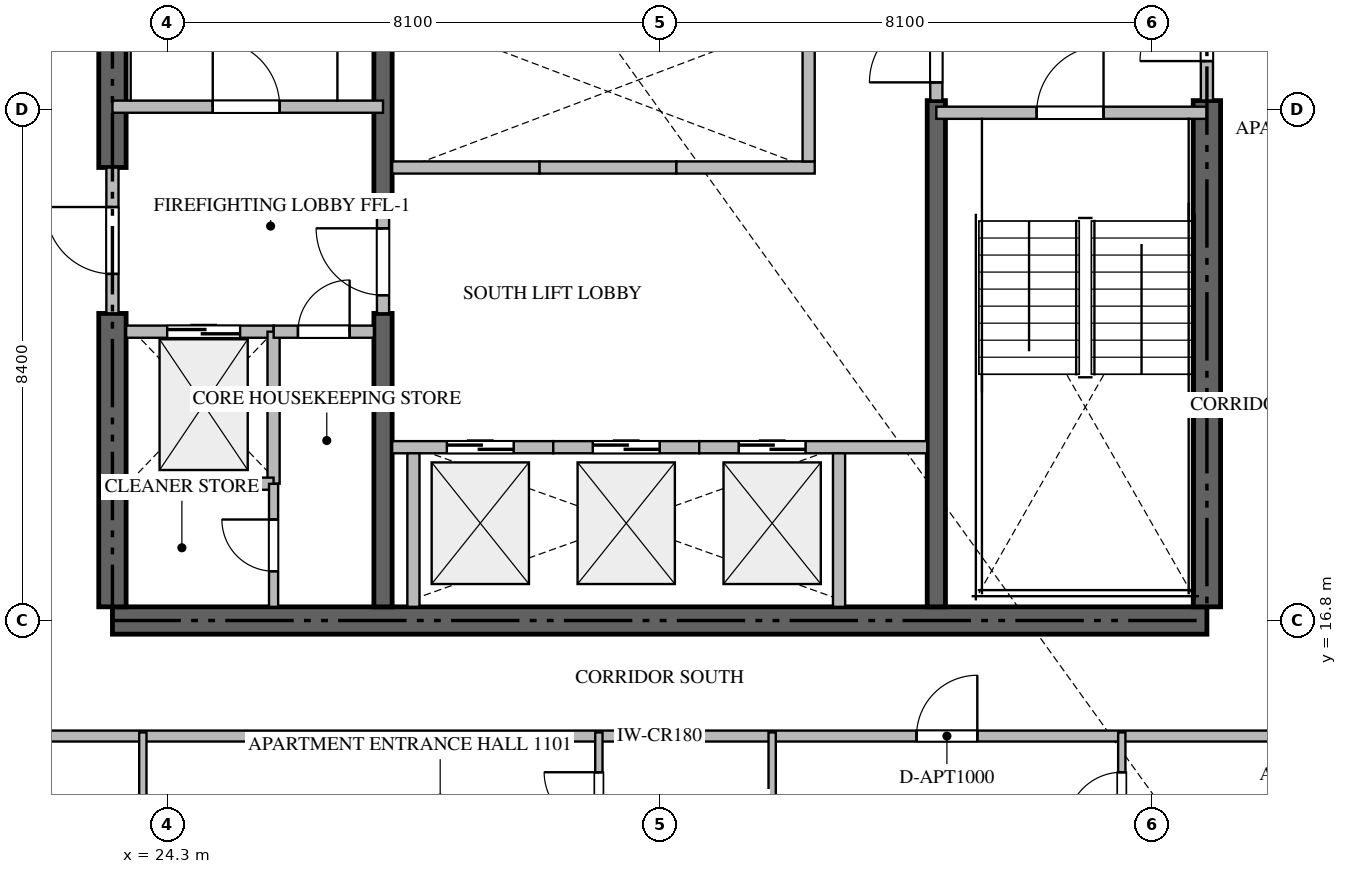
"""IFC4 building model, lengths in metres.
Left out: names, types, materials, properties, quantities, classifications, styles, units other than length and angle.
Written with IfcOpenShell. Run it as: python <this file> out.ifc"""

import sys

from ifc_helpers import new_model, si_unit, direction, frame, frame_2d, origin, place, context, subcontext, project, spatial, rectangle, extrude, source, transform, mapped, element, fill, save


model = new_model("IFC4")
c1 = context("Model", 3, precision=1e-05, world=origin(), true_north=direction((0.0, 1.0)))
c2 = subcontext(c1, "Body", "Model", "MODEL_VIEW")
j1 = project(units=[si_unit("LENGTHUNIT", "METRE"), si_unit("PLANEANGLEUNIT", "RADIAN")], contexts=[c1])
p1 = place(None, origin())
s1 = spatial("IfcSite", under=j1, at=p1, CompositionType="ELEMENT")
p2 = place(p1, origin())
s2 = spatial("IfcBuilding", under=s1, at=p2, CompositionType="ELEMENT")
p3 = place(p2, frame((0.0, 0.0, 49.2)))
s3 = spatial("IfcBuildingStorey", under=s2, at=p3, CompositionType="ELEMENT", Elevation=49.2)
p4 = place(p3, frame((23.4, 16.8, -0.26), z_axis=(0.0, 0.0, 1.0), x_axis=(1.0, 0.0, 0.0)))
e1 = element("IfcWall", 1, at=p4, inside=s3, PredefinedType="SHEAR", context=c2, shape_type="SweptSolid", body=[
    extrude(rectangle(XDim=18.0, YDim=0.45, at=frame_2d((9.0, 0.0))), origin(), (0.0, 0.0, 1.0), 3.748),
])
p5 = place(p3, frame((23.4, 17.025, -0.26), z_axis=(0.0, 0.0, 1.0), x_axis=(0.0, 1.0, 0.0)))
e2 = element("IfcWall", 2, at=p5, inside=s3, PredefinedType="SHEAR", context=c2, shape_type="SweptSolid", body=[
    extrude(rectangle(XDim=4.825, YDim=0.45, at=frame_2d((2.413, 0.0))), origin(), (0.0, 0.0, 1.0), 3.748),
])
p6 = place(p3, frame((23.4, 24.25, -0.26), z_axis=(0.0, 0.0, 1.0), x_axis=(0.0, 1.0, 0.0)))
e3 = element("IfcWall", 3, at=p6, inside=s3, PredefinedType="SHEAR", context=c2, shape_type="SweptSolid", body=[
    extrude(rectangle(XDim=9.125, YDim=0.45, at=frame_2d((4.562, 0.0))), origin(), (0.0, 0.0, 1.0), 3.748),
])
p7 = place(p3, frame((41.4, 17.025, -0.26), z_axis=(0.0, 0.0, 1.0), x_axis=(0.0, 1.0, 0.0)))
e4 = element("IfcWall", 4, at=p7, inside=s3, PredefinedType="SHEAR", context=c2, shape_type="SweptSolid", body=[
    extrude(rectangle(XDim=8.325, YDim=0.45, at=frame_2d((4.163, 0.0))), origin(), (0.0, 0.0, 1.0), 3.748),
])
p8 = place(p3, frame((27.85, 17.025, -0.26), z_axis=(0.0, 0.0, 1.0), x_axis=(0.0, 1.0, 0.0)))
e5 = element("IfcWall", 5, at=p8, inside=s3, PredefinedType="SHEAR", context=c2, shape_type="SweptSolid", body=[
    extrude(rectangle(XDim=4.825, YDim=0.3, at=frame_2d((2.413, 0.0))), origin(), (0.0, 0.0, 1.0), 3.748),
])
p9 = place(p3, frame((27.85, 23.55, -0.26), z_axis=(0.0, 0.0, 1.0), x_axis=(0.0, 1.0, 0.0)))
e6 = element("IfcWall", 6, at=p9, inside=s3, PredefinedType="SHEAR", context=c2, shape_type="SweptSolid", body=[
    extrude(rectangle(XDim=9.825, YDim=0.3, at=frame_2d((4.913, 0.0))), origin(), (0.0, 0.0, 1.0), 3.748),
])
p10 = place(p3, frame((36.95, 17.025, -0.26), z_axis=(0.0, 0.0, 1.0), x_axis=(0.0, 1.0, 0.0)))
e7 = element("IfcWall", 7, at=p10, inside=s3, PredefinedType="SHEAR", context=c2, shape_type="SweptSolid", body=[
    extrude(rectangle(XDim=8.325, YDim=0.3, at=frame_2d((4.163, 0.0))), origin(), (0.0, 0.0, 1.0), 3.748),
])
p11 = place(p3, frame((23.4, 25.25, 0.0), z_axis=(0.0, 0.0, 1.0), x_axis=(1.0, 0.0, 0.0)))
e8 = element("IfcWall", 8, at=p11, inside=s3, PredefinedType="STANDARD", context=c2, shape_type="SweptSolid", body=[
    extrude(rectangle(XDim=4.45, YDim=0.2, at=frame_2d((2.225, 0.0))), origin(), (0.0, 0.0, 1.0), 3.49),
])
p12 = place(p11, frame((1.65, 0.0, 0.0)))
e9 = element("IfcOpeningElement", 9, at=p12, cuts=e8, PredefinedType="OPENING", context=c2, shape_type="SweptSolid", body=[
    extrude(rectangle(XDim=1.1, YDim=2.15, at=frame_2d((0.55, 1.075))), frame((0.0, 0.11, 0.0), z_axis=(0.0, -1.0, 0.0), x_axis=(1.0, 0.0, 0.0)), (0.0, 0.0, 1.0), 0.22),
])
p13 = place(p3, frame((36.95, 25.15, 0.0), z_axis=(0.0, 0.0, 1.0), x_axis=(1.0, 0.0, 0.0)))
e10 = element("IfcWall", 10, at=p13, inside=s3, PredefinedType="STANDARD", context=c2, shape_type="SweptSolid", body=[
    extrude(rectangle(XDim=4.45, YDim=0.2, at=frame_2d((2.225, 0.0))), origin(), (0.0, 0.0, 1.0), 3.49),
])
p14 = place(p13, frame((1.65, 0.0, 0.0)))
e11 = element("IfcOpeningElement", 11, at=p14, cuts=e10, PredefinedType="OPENING", context=c2, shape_type="SweptSolid", body=[
    extrude(rectangle(XDim=1.1, YDim=2.15, at=frame_2d((0.55, 1.075))), frame((0.0, 0.11, 0.0), z_axis=(0.0, -1.0, 0.0), x_axis=(1.0, 0.0, 0.0)), (0.0, 0.0, 1.0), 0.22),
])
p15 = place(p3, frame((23.625, 21.55, 0.0), z_axis=(0.0, 0.0, 1.0), x_axis=(1.0, 0.0, 0.0)))
e12 = element("IfcWall", 12, at=p15, inside=s3, PredefinedType="STANDARD", context=c2, shape_type="SweptSolid", body=[
    extrude(rectangle(XDim=2.425, YDim=0.2, at=frame_2d((1.212, 0.0))), origin(), (0.0, 0.0, 1.0), 3.49),
])
p16 = place(p15, frame((0.675, 0.0, 0.0)))
e13 = element("IfcOpeningElement", 13, at=p16, cuts=e12, PredefinedType="OPENING", context=c2, shape_type="SweptSolid", body=[
    extrude(rectangle(XDim=1.2, YDim=2.2, at=frame_2d((0.6, 1.1))), frame((0.0, 0.11, 0.0), z_axis=(0.0, -1.0, 0.0), x_axis=(1.0, 0.0, 0.0)), (0.0, 0.0, 1.0), 0.22),
])
p17 = place(p3, frame((28.0, 19.65, 0.0), z_axis=(0.0, 0.0, 1.0), x_axis=(1.0, 0.0, 0.0)))
e14 = element("IfcWall", 14, at=p17, inside=s3, PredefinedType="STANDARD", context=c2, shape_type="SweptSolid", body=[
    extrude(rectangle(XDim=2.65, YDim=0.2, at=frame_2d((1.325, 0.0))), origin(), (0.0, 0.0, 1.0), 3.49),
])
p18 = place(p17, frame((0.9, 0.0, 0.0)))
e15 = element("IfcOpeningElement", 15, at=p18, cuts=e14, PredefinedType="OPENING", context=c2, shape_type="SweptSolid", body=[
    extrude(rectangle(XDim=1.1, YDim=2.2, at=frame_2d((0.55, 1.1))), frame((0.0, 0.11, 0.0), z_axis=(0.0, -1.0, 0.0), x_axis=(1.0, 0.0, 0.0)), (0.0, 0.0, 1.0), 0.22),
])
p19 = place(p3, frame((28.35, 17.025, 0.0), z_axis=(0.0, 0.0, 1.0), x_axis=(0.0, 1.0, 0.0)))
e16 = element("IfcWall", 16, at=p19, inside=s3, PredefinedType="STANDARD", context=c2, shape_type="SweptSolid", body=[
    extrude(rectangle(XDim=2.525, YDim=0.2, at=frame_2d((1.263, 0.0))), origin(), (0.0, 0.0, 1.0), 3.49),
])
p20 = place(p3, frame((30.65, 19.65, 0.0), z_axis=(0.0, 0.0, 1.0), x_axis=(1.0, 0.0, 0.0)))
e17 = element("IfcWall", 17, at=p20, inside=s3, PredefinedType="STANDARD", context=c2, shape_type="SweptSolid", body=[
    extrude(rectangle(XDim=2.4, YDim=0.2, at=frame_2d((1.2, 0.0))), origin(), (0.0, 0.0, 1.0), 3.49),
])
p21 = place(p20, frame((0.65, 0.0, 0.0)))
e18 = element("IfcOpeningElement", 18, at=p21, cuts=e17, PredefinedType="OPENING", context=c2, shape_type="SweptSolid", body=[
    extrude(rectangle(XDim=1.1, YDim=2.2, at=frame_2d((0.55, 1.1))), frame((0.0, 0.11, 0.0), z_axis=(0.0, -1.0, 0.0), x_axis=(1.0, 0.0, 0.0)), (0.0, 0.0, 1.0), 0.22),
])
p22 = place(p3, frame((33.05, 19.65, 0.0), z_axis=(0.0, 0.0, 1.0), x_axis=(1.0, 0.0, 0.0)))
e19 = element("IfcWall", 19, at=p22, inside=s3, PredefinedType="STANDARD", context=c2, shape_type="SweptSolid", body=[
    extrude(rectangle(XDim=3.75, YDim=0.2, at=frame_2d((1.875, 0.0))), origin(), (0.0, 0.0, 1.0), 3.49),
])
p23 = place(p22, frame((0.65, 0.0, 0.0)))
e20 = element("IfcOpeningElement", 20, at=p23, cuts=e19, PredefinedType="OPENING", context=c2, shape_type="SweptSolid", body=[
    extrude(rectangle(XDim=1.1, YDim=2.2, at=frame_2d((0.55, 1.1))), frame((0.0, 0.11, 0.0), z_axis=(0.0, -1.0, 0.0), x_axis=(1.0, 0.0, 0.0)), (0.0, 0.0, 1.0), 0.22),
])
p24 = place(p3, frame((35.35, 17.025, 0.0), z_axis=(0.0, 0.0, 1.0), x_axis=(0.0, 1.0, 0.0)))
e21 = element("IfcWall", 21, at=p24, inside=s3, PredefinedType="STANDARD", context=c2, shape_type="SweptSolid", body=[
    extrude(rectangle(XDim=2.525, YDim=0.2, at=frame_2d((1.263, 0.0))), origin(), (0.0, 0.0, 1.0), 3.49),
])
p25 = place(p3, frame((28.0, 24.25, 0.0), z_axis=(0.0, 0.0, 1.0), x_axis=(1.0, 0.0, 0.0)))
e22 = element("IfcWall", 22, at=p25, inside=s3, PredefinedType="STANDARD", context=c2, shape_type="SweptSolid", body=[
    extrude(rectangle(XDim=2.425, YDim=0.2, at=frame_2d((1.212, 0.0))), origin(), (0.0, 0.0, 1.0), 3.49),
])
p26 = place(p3, frame((30.425, 24.25, 0.0), z_axis=(0.0, 0.0, 1.0), x_axis=(1.0, 0.0, 0.0)))
e23 = element("IfcWall", 23, at=p26, inside=s3, PredefinedType="STANDARD", context=c2, shape_type="SweptSolid", body=[
    extrude(rectangle(XDim=2.25, YDim=0.2, at=frame_2d((1.125, 0.0))), origin(), (0.0, 0.0, 1.0), 3.49),
])
p27 = place(p3, frame((32.675, 24.25, 0.0), z_axis=(0.0, 0.0, 1.0), x_axis=(1.0, 0.0, 0.0)))
e24 = element("IfcWall", 24, at=p27, inside=s3, PredefinedType="STANDARD", context=c2, shape_type="SweptSolid", body=[
    extrude(rectangle(XDim=2.275, YDim=0.2, at=frame_2d((1.137, 0.0))), origin(), (0.0, 0.0, 1.0), 3.49),
])
for number, where, z_axis, x_axis in (
    (25, (34.85, 24.35, 0.0), (0.0, 0.0, 1.0), (0.0, 1.0, 0.0)),
    (26, (26.05, 19.05, 0.0), (0.0, 0.0, 1.0), (0.0, 1.0, 0.0)),
):
    element("IfcWall", number, at=place(p3, frame(where, z_axis=z_axis, x_axis=x_axis)), inside=s3, PredefinedType="STANDARD", context=c2, shape_type="SweptSolid", body=[
        extrude(rectangle(XDim=2.5, YDim=0.2, at=frame_2d((1.25, 0.0))), origin(), (0.0, 0.0, 1.0), 3.49),
    ])
p28 = place(p3, frame((23.625, 19.05, 0.0), z_axis=(0.0, 0.0, 1.0), x_axis=(1.0, 0.0, 0.0)))
e27 = element("IfcWall", 27, at=p28, inside=s3, PredefinedType="STANDARD", context=c2, shape_type="SweptSolid", body=[
    extrude(rectangle(XDim=2.425, YDim=0.2, at=frame_2d((1.212, 0.0))), origin(), (0.0, 0.0, 1.0), 3.49),
])
p29 = place(p3, frame((26.052, 21.55, 0.0), z_axis=(0.0, 0.0, 1.0), x_axis=(1.0, 0.0, 0.0)))
e28 = element("IfcWall", 28, at=p29, inside=s3, PredefinedType="STANDARD", context=c2, shape_type="SweptSolid", body=[
    extrude(rectangle(XDim=1.648, YDim=0.2, at=frame_2d((0.824, 0.0))), origin(), (0.0, 0.0, 1.0), 3.49),
])
p30 = place(p29, frame((0.399, 0.0, 0.0)))
e29 = element("IfcOpeningElement", 29, at=p30, cuts=e28, PredefinedType="OPENING", context=c2, shape_type="SweptSolid", body=[
    extrude(rectangle(XDim=0.85, YDim=2.1, at=frame_2d((0.425, 1.05))), frame((0.0, 0.11, 0.0), z_axis=(0.0, -1.0, 0.0), x_axis=(1.0, 0.0, 0.0)), (0.0, 0.0, 1.0), 0.22),
])
p31 = place(p3, frame((23.4, 21.852, 0.0), z_axis=(0.0, 0.0, 1.0), x_axis=(0.0, 1.0, 0.0)))
e30 = element("IfcWall", 30, at=p31, inside=s3, PredefinedType="STANDARD", context=c2, shape_type="SweptSolid", body=[
    extrude(rectangle(XDim=2.396, YDim=0.2, at=frame_2d((1.198, 0.0))), origin(), (0.0, 0.0, 1.0), 3.49),
])
p32 = place(p31, frame((0.648, 0.0, 0.0)))
e31 = element("IfcOpeningElement", 31, at=p32, cuts=e30, PredefinedType="OPENING", context=c2, shape_type="SweptSolid", body=[
    extrude(rectangle(XDim=1.1, YDim=2.15, at=frame_2d((0.55, 1.075))), frame((0.0, 0.11, 0.0), z_axis=(0.0, -1.0, 0.0), x_axis=(1.0, 0.0, 0.0)), (0.0, 0.0, 1.0), 0.22),
])
p33 = place(p3, frame((41.4, 25.352, 0.0), z_axis=(0.0, 0.0, 1.0), x_axis=(0.0, 1.0, 0.0)))
e32 = element("IfcWall", 32, at=p33, inside=s3, PredefinedType="STANDARD", context=c2, shape_type="SweptSolid", body=[
    extrude(rectangle(XDim=2.396, YDim=0.2, at=frame_2d((1.198, 0.0))), origin(), (0.0, 0.0, 1.0), 3.49),
])
p34 = place(p33, frame((0.648, 0.0, 0.0)))
e33 = element("IfcOpeningElement", 33, at=p34, cuts=e32, PredefinedType="OPENING", context=c2, shape_type="SweptSolid", body=[
    extrude(rectangle(XDim=1.1, YDim=2.15, at=frame_2d((0.55, 1.075))), frame((0.0, 0.11, 0.0), z_axis=(0.0, -1.0, 0.0), x_axis=(1.0, 0.0, 0.0)), (0.0, 0.0, 1.0), 0.22),
])
p35 = place(p3, frame((27.85, 21.852, 0.0), z_axis=(0.0, 0.0, 1.0), x_axis=(0.0, 1.0, 0.0)))
e34 = element("IfcWall", 34, at=p35, inside=s3, PredefinedType="STANDARD", context=c2, shape_type="SweptSolid", body=[
    extrude(rectangle(XDim=1.696, YDim=0.2, at=frame_2d((0.848, 0.0))), origin(), (0.0, 0.0, 1.0), 3.49),
])
p36 = place(p35, frame((0.298, 0.0, 0.0)))
e35 = element("IfcOpeningElement", 35, at=p36, cuts=e34, PredefinedType="OPENING", context=c2, shape_type="SweptSolid", body=[
    extrude(rectangle(XDim=1.1, YDim=2.15, at=frame_2d((0.55, 1.075))), frame((0.0, 0.11, 0.0), z_axis=(0.0, -1.0, 0.0), x_axis=(1.0, 0.0, 0.0)), (0.0, 0.0, 1.0), 0.22),
])
p37 = place(p3, frame((36.95, 25.352, 0.0), z_axis=(0.0, 0.0, 1.0), x_axis=(0.0, 1.0, 0.0)))
e36 = element("IfcWall", 36, at=p37, inside=s3, PredefinedType="STANDARD", context=c2, shape_type="SweptSolid", body=[
    extrude(rectangle(XDim=1.696, YDim=0.2, at=frame_2d((0.848, 0.0))), origin(), (0.0, 0.0, 1.0), 3.49),
])
p38 = place(p37, frame((0.298, 0.0, 0.0)))
e37 = element("IfcOpeningElement", 37, at=p38, cuts=e36, PredefinedType="OPENING", context=c2, shape_type="SweptSolid", body=[
    extrude(rectangle(XDim=1.1, YDim=2.15, at=frame_2d((0.55, 1.075))), frame((0.0, 0.11, 0.0), z_axis=(0.0, -1.0, 0.0), x_axis=(1.0, 0.0, 0.0)), (0.0, 0.0, 1.0), 0.22),
])
p39 = place(p3, frame((26.05, 17.025, 0.0), z_axis=(0.0, 0.0, 1.0), x_axis=(0.0, 1.0, 0.0)))
e38 = element("IfcWall", 38, at=p39, inside=s3, PredefinedType="PARTITIONING", context=c2, shape_type="SweptSolid", body=[
    extrude(rectangle(XDim=2.023, YDim=0.15, at=frame_2d((1.012, 0.0))), origin(), (0.0, 0.0, 1.0), 3.49),
])
p40 = place(p39, frame((0.586, 0.0, 0.0)))
e39 = element("IfcOpeningElement", 39, at=p40, cuts=e38, PredefinedType="OPENING", context=c2, shape_type="SweptSolid", body=[
    extrude(rectangle(XDim=0.85, YDim=2.1, at=frame_2d((0.425, 1.05))), frame((0.0, 0.085, 0.0), z_axis=(0.0, -1.0, 0.0), x_axis=(1.0, 0.0, 0.0)), (0.0, 0.0, 1.0), 0.17),
])
p41 = place(p3, frame((21.402, 14.9, 0.0), z_axis=(0.0, 0.0, 1.0), x_axis=(1.0, 0.0, 0.0)))
e40 = element("IfcWall", 40, at=p41, inside=s3, PredefinedType="PARTITIONING", context=c2, shape_type="SweptSolid", body=[
    extrude(rectangle(XDim=21.996, YDim=0.18, at=frame_2d((10.998, 0.0))), origin(), (0.0, 0.0, 1.0), 3.49),
])
p42 = place(p41, frame((15.222, 0.0, 0.0)))
e41 = element("IfcOpeningElement", 41, at=p42, cuts=e40, PredefinedType="OPENING", context=c2, shape_type="SweptSolid", body=[
    extrude(rectangle(XDim=1.0, YDim=2.15, at=frame_2d((0.5, 1.075))), frame((0.0, 0.1, 0.0), z_axis=(0.0, -1.0, 0.0), x_axis=(1.0, 0.0, 0.0)), (0.0, 0.0, 1.0), 0.2),
])
p43 = place(p3, frame((34.25, 12.15, 0.0), z_axis=(0.0, 0.0, 1.0), x_axis=(0.0, 1.0, 0.0)))
e42 = element("IfcWall", 42, at=p43, inside=s3, PredefinedType="PARTITIONING", context=c2, shape_type="SweptSolid", body=[
    extrude(rectangle(XDim=2.81, YDim=0.12, at=frame_2d((1.405, 0.0))), origin(), (0.0, 0.0, 1.0), 3.49),
])
p44 = place(p3, frame((31.4, 12.75, 0.0), z_axis=(0.0, 0.0, 1.0), x_axis=(0.0, 1.0, 0.0)))
e43 = element("IfcWall", 43, at=p44, inside=s3, PredefinedType="PARTITIONING", context=c2, shape_type="SweptSolid", body=[
    extrude(rectangle(XDim=2.21, YDim=0.12, at=frame_2d((1.105, 0.0))), origin(), (0.0, 0.0, 1.0), 3.49),
])
p45 = place(p44, frame((0.655, 0.0, 0.0)))
e44 = element("IfcOpeningElement", 44, at=p45, cuts=e43, PredefinedType="OPENING", context=c2, shape_type="SweptSolid", body=[
    extrude(rectangle(XDim=0.9, YDim=2.1, at=frame_2d((0.45, 1.05))), frame((0.0, 0.07, 0.0), z_axis=(0.0, -1.0, 0.0), x_axis=(1.0, 0.0, 0.0)), (0.0, 0.0, 1.0), 0.14),
])
p46 = place(p3, frame((23.9, 12.752, 0.0), z_axis=(0.0, 0.0, 1.0), x_axis=(0.0, 1.0, 0.0)))
e45 = element("IfcWall", 45, at=p46, inside=s3, PredefinedType="PARTITIONING", context=c2, shape_type="SweptSolid", body=[
    extrude(rectangle(XDim=2.208, YDim=0.12, at=frame_2d((1.104, 0.0))), origin(), (0.0, 0.0, 1.0), 3.49),
])
p47 = place(p3, frame((40.0, 12.75, 0.0), z_axis=(0.0, 0.0, 1.0), x_axis=(0.0, 1.0, 0.0)))
e46 = element("IfcWall", 46, at=p47, inside=s3, PredefinedType="PARTITIONING", context=c2, shape_type="SweptSolid", body=[
    extrude(rectangle(XDim=2.21, YDim=0.12, at=frame_2d((1.105, 0.0))), origin(), (0.0, 0.0, 1.0), 3.49),
])
p48 = place(p47, frame((0.655, 0.0, 0.0)))
e47 = element("IfcOpeningElement", 47, at=p48, cuts=e46, PredefinedType="OPENING", context=c2, shape_type="SweptSolid", body=[
    extrude(rectangle(XDim=0.9, YDim=2.1, at=frame_2d((0.45, 1.05))), frame((0.0, 0.07, 0.0), z_axis=(0.0, -1.0, 0.0), x_axis=(1.0, 0.0, 0.0)), (0.0, 0.0, 1.0), 0.14),
])
m1 = source(origin(), c2, "Body", "SweptSolid", [
    extrude(rectangle(XDim=1.1, YDim=2.15, at=frame_2d((0.55, 1.075))), frame((0.0, 0.025, 0.0), z_axis=(0.0, -1.0, 0.0), x_axis=(1.0, 0.0, 0.0)), (0.0, 0.0, 1.0), 0.05),
])
p49 = place(p12, origin())
e48 = element("IfcDoor", 48, at=p49, inside=s3, OperationType="SINGLE_SWING_LEFT", PredefinedType="DOOR", context=c2, shape_type="MappedRepresentation", body=[
    mapped(m1, transform((0.0, 0.0, 0.0), scale=1.0)),
])
fill(e9, e48)
p50 = place(p14, origin())
e49 = element("IfcDoor", 49, at=p50, inside=s3, OperationType="SINGLE_SWING_RIGHT", PredefinedType="DOOR", context=c2, shape_type="MappedRepresentation", body=[
    mapped(m1, transform((0.0, 0.0, 0.0), scale=1.0)),
])
fill(e11, e49)
m2 = source(origin(), c2, "Body", "SweptSolid", [
    extrude(rectangle(XDim=1.2, YDim=2.2, at=frame_2d((0.6, 1.1))), frame((0.0, 0.025, 0.0), z_axis=(0.0, -1.0, 0.0), x_axis=(1.0, 0.0, 0.0)), (0.0, 0.0, 1.0), 0.05),
])
p51 = place(p16, origin())
e50 = element("IfcDoor", 50, at=p51, inside=s3, OperationType="DOUBLE_DOOR_SLIDING", PredefinedType="DOOR", context=c2, shape_type="MappedRepresentation", body=[
    mapped(m2, transform((0.0, 0.0, 0.0), scale=1.0)),
])
fill(e13, e50)
m3 = source(origin(), c2, "Body", "SweptSolid", [
    extrude(rectangle(XDim=1.1, YDim=2.2, at=frame_2d((0.55, 1.1))), frame((0.0, 0.025, 0.0), z_axis=(0.0, -1.0, 0.0), x_axis=(1.0, 0.0, 0.0)), (0.0, 0.0, 1.0), 0.05),
])
p52 = place(p18, origin())
e51 = element("IfcDoor", 51, at=p52, inside=s3, OperationType="DOUBLE_DOOR_SLIDING", PredefinedType="DOOR", context=c2, shape_type="MappedRepresentation", body=[
    mapped(m3, transform((0.0, 0.0, 0.0), scale=1.0)),
])
fill(e15, e51)
p53 = place(p21, origin())
e52 = element("IfcDoor", 52, at=p53, inside=s3, OperationType="DOUBLE_DOOR_SLIDING", PredefinedType="DOOR", context=c2, shape_type="MappedRepresentation", body=[
    mapped(m3, transform((0.0, 0.0, 0.0), scale=1.0)),
])
fill(e18, e52)
p54 = place(p23, origin())
e53 = element("IfcDoor", 53, at=p54, inside=s3, OperationType="DOUBLE_DOOR_SLIDING", PredefinedType="DOOR", context=c2, shape_type="MappedRepresentation", body=[
    mapped(m3, transform((0.0, 0.0, 0.0), scale=1.0)),
])
fill(e20, e53)
m4 = source(origin(), c2, "Body", "SweptSolid", [
    extrude(rectangle(XDim=0.85, YDim=2.1, at=frame_2d((0.425, 1.05))), frame((0.0, 0.025, 0.0), z_axis=(0.0, -1.0, 0.0), x_axis=(1.0, 0.0, 0.0)), (0.0, 0.0, 1.0), 0.05),
])
p55 = place(p30, origin())
e54 = element("IfcDoor", 54, at=p55, inside=s3, OperationType="SINGLE_SWING_RIGHT", PredefinedType="DOOR", context=c2, shape_type="MappedRepresentation", body=[
    mapped(m4, transform((0.0, 0.0, 0.0), scale=1.0)),
])
fill(e29, e54)
p56 = place(p32, origin())
e55 = element("IfcDoor", 55, at=p56, inside=s3, OperationType="SINGLE_SWING_RIGHT", PredefinedType="DOOR", context=c2, shape_type="MappedRepresentation", body=[
    mapped(m1, transform((0.0, 0.0, 0.0), scale=1.0)),
])
fill(e31, e55)
p57 = place(p34, origin())
e56 = element("IfcDoor", 56, at=p57, inside=s3, OperationType="SINGLE_SWING_LEFT", PredefinedType="DOOR", context=c2, shape_type="MappedRepresentation", body=[
    mapped(m1, transform((0.0, 0.0, 0.0), scale=1.0)),
])
fill(e33, e56)
p58 = place(p36, origin())
e57 = element("IfcDoor", 57, at=p58, inside=s3, OperationType="SINGLE_SWING_RIGHT", PredefinedType="DOOR", context=c2, shape_type="MappedRepresentation", body=[
    mapped(m1, transform((0.0, 0.0, 0.0), scale=1.0)),
])
fill(e35, e57)
p59 = place(p38, origin())
e58 = element("IfcDoor", 58, at=p59, inside=s3, OperationType="SINGLE_SWING_LEFT", PredefinedType="DOOR", context=c2, shape_type="MappedRepresentation", body=[
    mapped(m1, transform((0.0, 0.0, 0.0), scale=1.0)),
])
fill(e37, e58)
p60 = place(p40, origin())
e59 = element("IfcDoor", 59, at=p60, inside=s3, OperationType="SINGLE_SWING_RIGHT", PredefinedType="DOOR", context=c2, shape_type="MappedRepresentation", body=[
    mapped(m4, transform((0.0, 0.0, 0.0), scale=1.0)),
])
fill(e39, e59)
m5 = source(origin(), c2, "Body", "SweptSolid", [
    extrude(rectangle(XDim=1.0, YDim=2.15, at=frame_2d((0.5, 1.075))), frame((0.0, 0.025, 0.0), z_axis=(0.0, -1.0, 0.0), x_axis=(1.0, 0.0, 0.0)), (0.0, 0.0, 1.0), 0.05),
])
p61 = place(p42, origin())
e60 = element("IfcDoor", 60, at=p61, inside=s3, OperationType="SINGLE_SWING_RIGHT", PredefinedType="DOOR", context=c2, shape_type="MappedRepresentation", body=[
    mapped(m5, transform((0.0, 0.0, 0.0), scale=1.0)),
])
fill(e41, e60)
m6 = source(origin(), c2, "Body", "SweptSolid", [
    extrude(rectangle(XDim=0.9, YDim=2.1, at=frame_2d((0.45, 1.05))), frame((0.0, 0.025, 0.0), z_axis=(0.0, -1.0, 0.0), x_axis=(1.0, 0.0, 0.0)), (0.0, 0.0, 1.0), 0.05),
])
p62 = place(p45, origin())
e61 = element("IfcDoor", 61, at=p62, inside=s3, OperationType="SINGLE_SWING_RIGHT", PredefinedType="DOOR", context=c2, shape_type="MappedRepresentation", body=[
    mapped(m6, transform((0.0, 0.0, 0.0), scale=1.0)),
])
fill(e44, e61)
p63 = place(p48, origin())
e62 = element("IfcDoor", 62, at=p63, inside=s3, OperationType="SINGLE_SWING_LEFT", PredefinedType="DOOR", context=c2, shape_type="MappedRepresentation", body=[
    mapped(m6, transform((0.0, 0.0, 0.0), scale=1.0)),
])
fill(e47, e62)
save(model, sys.argv[1])
